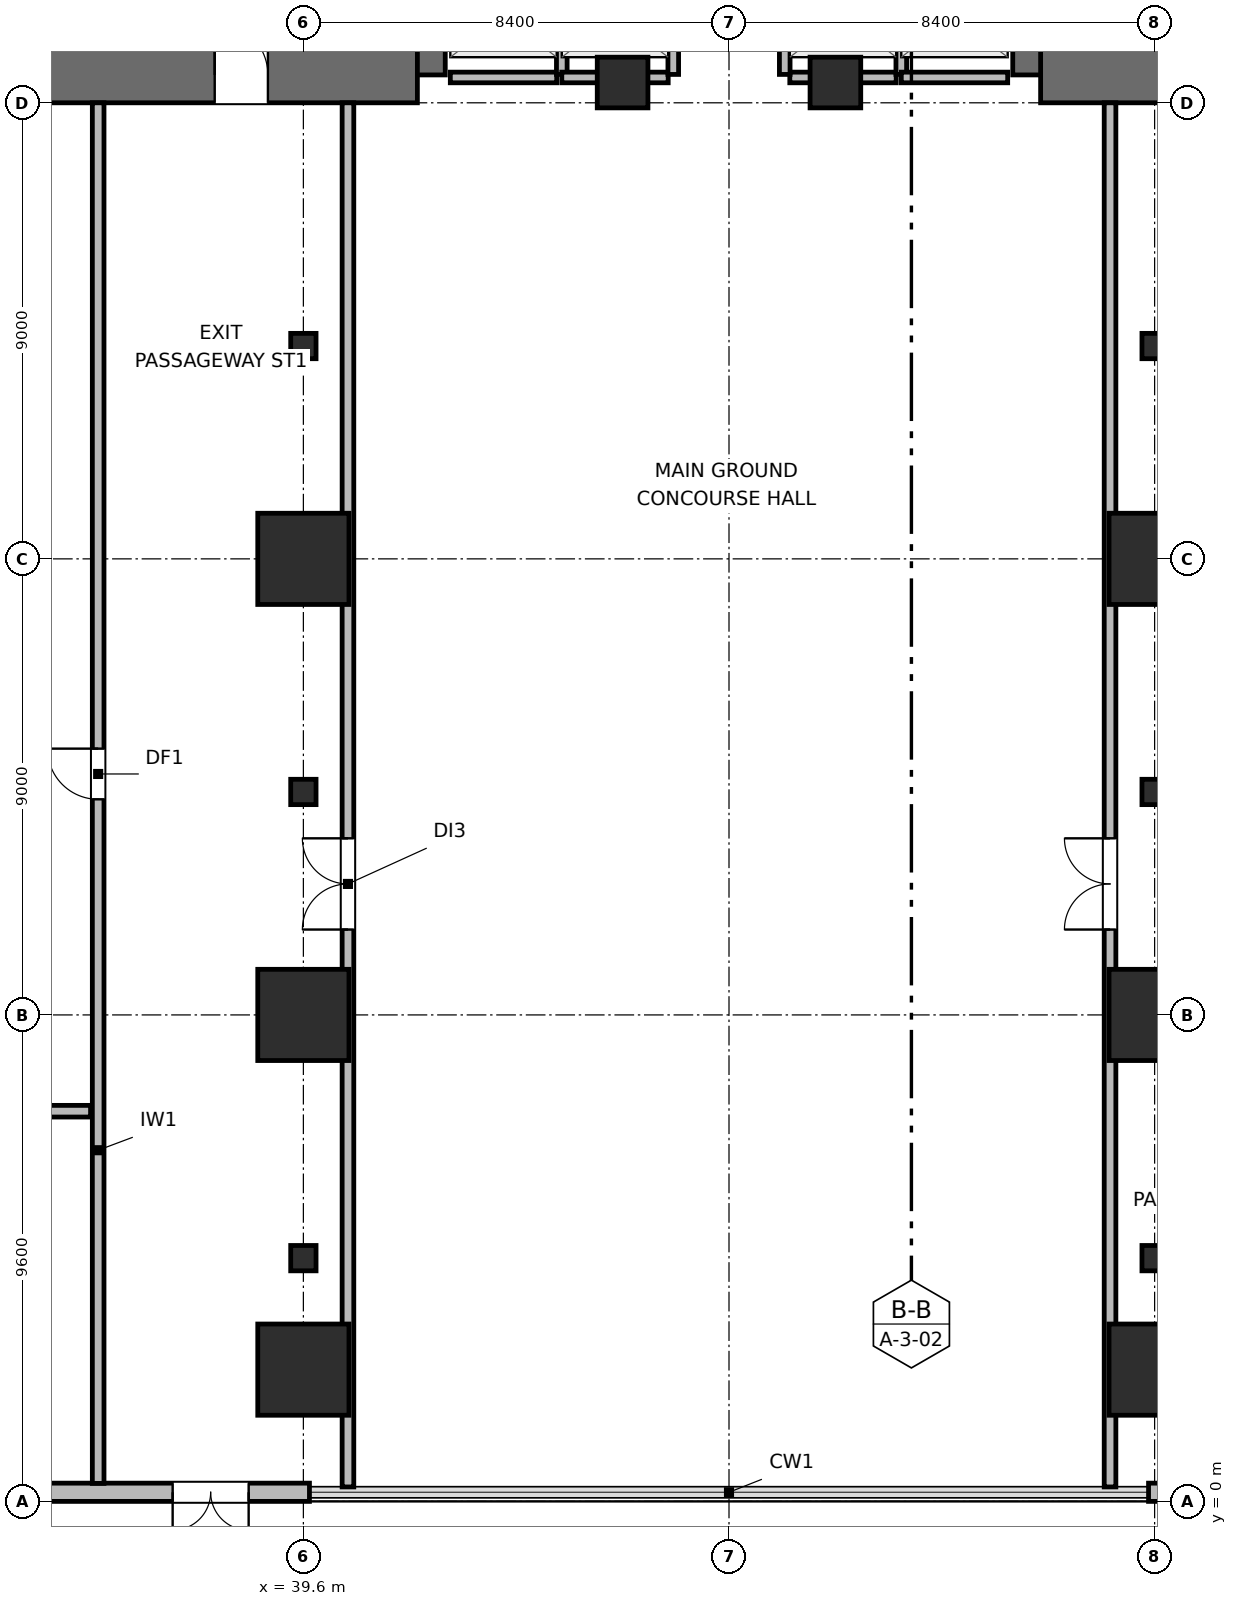
"""IFC4 building model, lengths in metres.
Left out: names, types, materials, properties, quantities, classifications, styles, units other than length and angle.
Written with IfcOpenShell. Run it as: python <this file> out.ifc"""

import sys

from ifc_helpers import new_model, si_unit, direction, frame, frame_2d, origin, origin_2d, place, context, subcontext, project, spatial, rectangle, hollow_rectangle, extrude, element, fill, save


model = new_model("IFC4")
c1 = context("Model", 3, precision=1e-05, world=origin(), true_north=direction((0.0, 1.0)))
c2 = subcontext(c1, "Body", "Model", "MODEL_VIEW")
j1 = project(units=[si_unit("LENGTHUNIT", "METRE"), si_unit("PLANEANGLEUNIT", "RADIAN")], contexts=[c1])
p1 = place(None, origin())
s1 = spatial("IfcSite", under=j1, at=p1, CompositionType="ELEMENT")
p2 = place(p1, origin())
s2 = spatial("IfcBuilding", under=s1, at=p2, CompositionType="ELEMENT")
p3 = place(p2, origin())
s3 = spatial("IfcBuildingStorey", under=s2, at=p3, CompositionType="ELEMENT", Elevation=0.0)
p4 = place(p3, frame((41.85, 28.15, 0.0), z_axis=(0.0, 0.0, 1.0), x_axis=(0.0, 1.0, 0.0)))
e1 = element("IfcWall", 1, at=p4, inside=s3, PredefinedType="SHEAR", context=c2, shape_type="SweptSolid", body=[
    extrude(rectangle(XDim=6.25, YDim=1.1, at=frame_2d((3.125, 0.0))), origin(), (0.0, 0.0, 1.0), 4.5),
])
p5 = place(p3, frame((32.95, 28.15, 0.0), z_axis=(0.0, 0.0, 1.0), x_axis=(1.0, 0.0, 0.0)))
e2 = element("IfcWall", 2, at=p5, inside=s3, PredefinedType="SHEAR", context=c2, shape_type="SweptSolid", body=[
    extrude(rectangle(XDim=8.9, YDim=1.1, at=frame_2d((4.45, 0.0))), origin(), (0.0, 0.0, 1.0), 4.5),
])
p6 = place(p5, frame((4.9, 0.0, 0.0)))
e3 = element("IfcOpeningElement", 3, at=p6, cuts=e2, PredefinedType="OPENING", context=c2, shape_type="SweptSolid", body=[
    extrude(rectangle(XDim=1.05, YDim=2.04, at=frame_2d((0.525, 1.02))), frame((0.0, 0.56, 0.0), z_axis=(0.0, -1.0, 0.0), x_axis=(1.0, 0.0, 0.0)), (0.0, 0.0, 1.0), 1.12),
])
p7 = place(p3, frame((54.15, 28.15, 0.0), z_axis=(0.0, 0.0, 1.0), x_axis=(0.0, 1.0, 0.0)))
e4 = element("IfcWall", 4, at=p7, inside=s3, PredefinedType="SHEAR", context=c2, shape_type="SweptSolid", body=[
    extrude(rectangle(XDim=7.65, YDim=1.1, at=frame_2d((3.825, 0.0))), origin(), (0.0, 0.0, 1.0), 4.5),
])
p8 = place(p3, frame((54.15, 28.15, 0.0), z_axis=(0.0, 0.0, 1.0), x_axis=(1.0, 0.0, 0.0)))
e5 = element("IfcWall", 5, at=p8, inside=s3, PredefinedType="SHEAR", context=c2, shape_type="SweptSolid", body=[
    extrude(rectangle(XDim=8.9, YDim=1.1, at=frame_2d((4.45, 0.0))), origin(), (0.0, 0.0, 1.0), 4.5),
])
p9 = place(p8, frame((3.85, 0.0, 0.0)))
e6 = element("IfcOpeningElement", 6, at=p9, cuts=e5, PredefinedType="OPENING", context=c2, shape_type="SweptSolid", body=[
    extrude(rectangle(XDim=1.05, YDim=2.04, at=frame_2d((0.525, 1.02))), frame((0.0, 0.56, 0.0), z_axis=(0.0, -1.0, 0.0), x_axis=(1.0, 0.0, 0.0)), (0.0, 0.0, 1.0), 1.12),
])
for number, where, z_axis, x_axis in (
    (7, (39.6, 2.6, 0.0), (0.0, 0.0, 1.0), (1.0, 0.0, 0.0)),
    (8, (39.6, 9.6, 0.0), (0.0, 0.0, 1.0), (1.0, 0.0, 0.0)),
    (9, (39.6, 18.6, 0.0), (0.0, 0.0, 1.0), (1.0, 0.0, 0.0)),
    (10, (56.4, 2.6, 0.0), (0.0, 0.0, 1.0), (1.0, 0.0, 0.0)),
    (11, (56.4, 9.6, 0.0), (0.0, 0.0, 1.0), (1.0, 0.0, 0.0)),
    (12, (56.4, 18.6, 0.0), (0.0, 0.0, 1.0), (1.0, 0.0, 0.0)),
):
    element("IfcColumn", number, at=place(p3, frame(where, z_axis=z_axis, x_axis=x_axis)), inside=s3, PredefinedType="COLUMN", context=c2, shape_type="SweptSolid", body=[
        extrude(rectangle(XDim=1.8, YDim=1.8, at=origin_2d()), origin(), (0.0, 0.0, 1.0), 4.5),
    ])
for number, where, z_axis, x_axis in (
    (13, (45.9, 28.0, 0.0), (0.0, 0.0, 1.0), (1.0, 0.0, 0.0)),
    (14, (50.1, 28.0, 0.0), (0.0, 0.0, 1.0), (1.0, 0.0, 0.0)),
):
    element("IfcColumn", number, at=place(p3, frame(where, z_axis=z_axis, x_axis=x_axis)), inside=s3, PredefinedType="COLUMN", context=c2, shape_type="SweptSolid", body=[
        extrude(rectangle(XDim=1.0, YDim=1.0, at=origin_2d()), origin(), (0.0, 0.0, 1.0), 4.5),
    ])
for number, where, z_axis, x_axis in (
    (15, (39.6, 4.8, 0.0), (0.0, 0.0, 1.0), (1.0, 0.0, 0.0)),
    (16, (39.6, 14.0, 0.0), (0.0, 0.0, 1.0), (1.0, 0.0, 0.0)),
    (17, (39.6, 22.8, 0.0), (0.0, 0.0, 1.0), (1.0, 0.0, 0.0)),
    (18, (56.4, 4.8, 0.0), (0.0, 0.0, 1.0), (1.0, 0.0, 0.0)),
    (19, (56.4, 14.0, 0.0), (0.0, 0.0, 1.0), (1.0, 0.0, 0.0)),
    (20, (56.4, 22.8, 0.0), (0.0, 0.0, 1.0), (1.0, 0.0, 0.0)),
):
    element("IfcColumn", number, at=place(p3, frame(where, z_axis=z_axis, x_axis=x_axis)), inside=s3, PredefinedType="PILASTER", context=c2, shape_type="SweptSolid", body=[
        extrude(hollow_rectangle(XDim=0.5, YDim=0.5, WallThickness=0.025, at=origin_2d()), origin(), (0.0, 0.0, 1.0), 4.18),
    ])
p10 = place(p3, frame((96.0, 0.18, 0.0), z_axis=(0.0, 0.0, 1.0), x_axis=(-1.0, 0.0, 0.0)))
e21 = element("IfcWall", 21, at=p10, inside=s3, PredefinedType="SOLIDWALL", context=c2, shape_type="SweptSolid", body=[
    extrude(rectangle(XDim=39.72, YDim=0.36, at=frame_2d((19.86, 0.0))), origin(), (0.0, 0.0, 1.0), 4.18),
])
p11 = place(p10, frame((37.0, 0.0, 0.0)))
e22 = element("IfcOpeningElement", 22, at=p11, cuts=e21, PredefinedType="OPENING", context=c2, shape_type="SweptSolid", body=[
    extrude(rectangle(XDim=1.5, YDim=2.15, at=frame_2d((0.75, 1.075))), frame((0.0, 0.19, 0.0), z_axis=(0.0, -1.0, 0.0), x_axis=(1.0, 0.0, 0.0)), (0.0, 0.0, 1.0), 0.38),
])
p12 = place(p10, frame((20.0, 0.0, 0.0)))
e23 = element("IfcOpeningElement", 23, at=p12, cuts=e21, PredefinedType="OPENING", context=c2, shape_type="SweptSolid", body=[
    extrude(rectangle(XDim=2.4, YDim=2.4, at=frame_2d((1.2, 1.2))), frame((0.0, 0.19, 0.0), z_axis=(0.0, -1.0, 0.0), x_axis=(1.0, 0.0, 0.0)), (0.0, 0.0, 1.0), 0.38),
])
p13 = place(p3, frame((39.72, 0.18, 0.0), z_axis=(0.0, 0.0, 1.0), x_axis=(-1.0, 0.0, 0.0)))
e24 = element("IfcWall", 24, at=p13, inside=s3, PredefinedType="SOLIDWALL", context=c2, shape_type="SweptSolid", body=[
    extrude(rectangle(XDim=39.72, YDim=0.36, at=frame_2d((19.86, 0.0))), origin(), (0.0, 0.0, 1.0), 4.18),
])
p14 = place(p13, frame((1.2, 0.0, 0.0)))
e25 = element("IfcOpeningElement", 25, at=p14, cuts=e24, PredefinedType="OPENING", context=c2, shape_type="SweptSolid", body=[
    extrude(rectangle(XDim=1.5, YDim=2.15, at=frame_2d((0.75, 1.075))), frame((0.0, 0.19, 0.0), z_axis=(0.0, -1.0, 0.0), x_axis=(1.0, 0.0, 0.0)), (0.0, 0.0, 1.0), 0.38),
])
p15 = place(p13, frame((21.0, 0.0, 0.0)))
e26 = element("IfcOpeningElement", 26, at=p15, cuts=e24, PredefinedType="OPENING", context=c2, shape_type="SweptSolid", body=[
    extrude(rectangle(XDim=2.4, YDim=2.4, at=frame_2d((1.2, 1.2))), frame((0.0, 0.19, 0.0), z_axis=(0.0, -1.0, 0.0), x_axis=(1.0, 0.0, 0.0)), (0.0, 0.0, 1.0), 0.38),
])
p16 = place(p13, frame((10.2, 0.0, 0.0)))
e27 = element("IfcOpeningElement", 27, at=p16, cuts=e24, PredefinedType="OPENING", context=c2, shape_type="SweptSolid", body=[
    extrude(rectangle(XDim=1.4, YDim=2.15, at=frame_2d((0.7, 1.075))), frame((0.0, 0.19, 0.0), z_axis=(0.0, -1.0, 0.0), x_axis=(1.0, 0.0, 0.0)), (0.0, 0.0, 1.0), 0.38),
])
p17 = place(p3, frame((42.5, 28.1, 0.0), z_axis=(0.0, 0.0, 1.0), x_axis=(1.0, 0.0, 0.0)))
e28 = element("IfcWall", 28, at=p17, inside=s3, PredefinedType="PARTITIONING", context=c2, shape_type="SweptSolid", body=[
    extrude(rectangle(XDim=2.1, YDim=0.21, at=frame_2d((1.05, 0.0))), origin(), (0.0, 0.0, 1.0), 3.065),
])
p18 = place(p3, frame((44.7, 28.16, 0.0), z_axis=(0.0, 0.0, 1.0), x_axis=(0.0, 1.0, 0.0)))
e29 = element("IfcWall", 29, at=p18, inside=s3, PredefinedType="PARTITIONING", context=c2, shape_type="SweptSolid", body=[
    extrude(rectangle(XDim=2.28, YDim=0.21, at=frame_2d((1.14, 0.0))), origin(), (0.0, 0.0, 1.0), 4.18),
])
p19 = place(p3, frame((44.7, 28.1, 0.0), z_axis=(0.0, 0.0, 1.0), x_axis=(1.0, 0.0, 0.0)))
e30 = element("IfcWall", 30, at=p19, inside=s3, PredefinedType="PARTITIONING", context=c2, shape_type="SweptSolid", body=[
    extrude(rectangle(XDim=2.1, YDim=0.21, at=frame_2d((1.05, 0.0))), origin(), (0.0, 0.0, 1.0), 3.065),
])
p20 = place(p3, frame((46.9, 28.16, 0.0), z_axis=(0.0, 0.0, 1.0), x_axis=(0.0, 1.0, 0.0)))
e31 = element("IfcWall", 31, at=p20, inside=s3, PredefinedType="PARTITIONING", context=c2, shape_type="SweptSolid", body=[
    extrude(rectangle(XDim=2.28, YDim=0.21, at=frame_2d((1.14, 0.0))), origin(), (0.0, 0.0, 1.0), 4.18),
])
p21 = place(p3, frame((49.2, 28.1, 0.0), z_axis=(0.0, 0.0, 1.0), x_axis=(1.0, 0.0, 0.0)))
e32 = element("IfcWall", 32, at=p21, inside=s3, PredefinedType="PARTITIONING", context=c2, shape_type="SweptSolid", body=[
    extrude(rectangle(XDim=2.1, YDim=0.21, at=frame_2d((1.05, 0.0))), origin(), (0.0, 0.0, 1.0), 3.065),
])
for number, where, z_axis, x_axis in (
    (33, (49.1, 28.16, 0.0), (0.0, 0.0, 1.0), (0.0, 1.0, 0.0)),
    (34, (51.4, 28.16, 0.0), (0.0, 0.0, 1.0), (0.0, 1.0, 0.0)),
):
    element("IfcWall", number, at=place(p3, frame(where, z_axis=z_axis, x_axis=x_axis)), inside=s3, PredefinedType="PARTITIONING", context=c2, shape_type="SweptSolid", body=[
        extrude(rectangle(XDim=2.28, YDim=0.21, at=frame_2d((1.14, 0.0))), origin(), (0.0, 0.0, 1.0), 4.18),
    ])
p22 = place(p3, frame((51.4, 28.1, 0.0), z_axis=(0.0, 0.0, 1.0), x_axis=(1.0, 0.0, 0.0)))
e35 = element("IfcWall", 35, at=p22, inside=s3, PredefinedType="PARTITIONING", context=c2, shape_type="SweptSolid", body=[
    extrude(rectangle(XDim=2.1, YDim=0.21, at=frame_2d((1.05, 0.0))), origin(), (0.0, 0.0, 1.0), 3.065),
])
p23 = place(p3, frame((35.55, 0.355, 0.0), z_axis=(0.0, 0.0, 1.0), x_axis=(0.0, 1.0, 0.0)))
e36 = element("IfcWall", 36, at=p23, inside=s3, PredefinedType="PARTITIONING", context=c2, shape_type="SweptSolid", body=[
    extrude(rectangle(XDim=27.245, YDim=0.23, at=frame_2d((13.623, 0.0))), origin(), (0.0, 0.0, 1.0), 4.18),
])
p24 = place(p23, frame((13.5, 0.0, 0.0)))
e37 = element("IfcOpeningElement", 37, at=p24, cuts=e36, PredefinedType="OPENING", context=c2, shape_type="SweptSolid", body=[
    extrude(rectangle(XDim=1.0, YDim=2.04, at=frame_2d((0.5, 1.02))), frame((0.0, 0.125, 0.0), z_axis=(0.0, -1.0, 0.0), x_axis=(1.0, 0.0, 0.0)), (0.0, 0.0, 1.0), 0.25),
])
p25 = place(p3, frame((40.48, 0.285, 0.0), z_axis=(0.0, 0.0, 1.0), x_axis=(0.0, 1.0, 0.0)))
e38 = element("IfcWall", 38, at=p25, inside=s3, PredefinedType="PARTITIONING", context=c2, shape_type="SweptSolid", body=[
    extrude(rectangle(XDim=27.315, YDim=0.23, at=frame_2d((13.658, 0.0))), origin(), (0.0, 0.0, 1.0), 4.18),
])
p26 = place(p25, frame((11.0, 0.0, 0.0)))
e39 = element("IfcOpeningElement", 39, at=p26, cuts=e38, PredefinedType="OPENING", context=c2, shape_type="SweptSolid", body=[
    extrude(rectangle(XDim=1.8, YDim=2.06, at=frame_2d((0.9, 1.03))), frame((0.0, 0.125, 0.0), z_axis=(0.0, -1.0, 0.0), x_axis=(1.0, 0.0, 0.0)), (0.0, 0.0, 1.0), 0.25),
])
p27 = place(p3, frame((55.52, 0.285, 0.0), z_axis=(0.0, 0.0, 1.0), x_axis=(0.0, 1.0, 0.0)))
e40 = element("IfcWall", 40, at=p27, inside=s3, PredefinedType="PARTITIONING", context=c2, shape_type="SweptSolid", body=[
    extrude(rectangle(XDim=27.315, YDim=0.23, at=frame_2d((13.658, 0.0))), origin(), (0.0, 0.0, 1.0), 4.18),
])
p28 = place(p27, frame((11.0, 0.0, 0.0)))
e41 = element("IfcOpeningElement", 41, at=p28, cuts=e40, PredefinedType="OPENING", context=c2, shape_type="SweptSolid", body=[
    extrude(rectangle(XDim=1.8, YDim=2.06, at=frame_2d((0.9, 1.03))), frame((0.0, 0.125, 0.0), z_axis=(0.0, -1.0, 0.0), x_axis=(1.0, 0.0, 0.0)), (0.0, 0.0, 1.0), 0.25),
])
p29 = place(p3, frame((25.5, 7.7, 0.0), z_axis=(0.0, 0.0, 1.0), x_axis=(1.0, 0.0, 0.0)))
e42 = element("IfcWall", 42, at=p29, inside=s3, PredefinedType="PARTITIONING", context=c2, shape_type="SweptSolid", body=[
    extrude(rectangle(XDim=9.9, YDim=0.23, at=frame_2d((4.95, 0.0))), origin(), (0.0, 0.0, 1.0), 4.18),
])
p30 = place(p29, frame((3.5, 0.0, 0.0)))
e43 = element("IfcOpeningElement", 43, at=p30, cuts=e42, PredefinedType="OPENING", context=c2, shape_type="SweptSolid", body=[
    extrude(rectangle(XDim=1.0, YDim=2.04, at=frame_2d((0.5, 1.02))), frame((0.0, 0.125, 0.0), z_axis=(0.0, -1.0, 0.0), x_axis=(1.0, 0.0, 0.0)), (0.0, 0.0, 1.0), 0.25),
])
p31 = place(p14, origin())
e44 = element("IfcDoor", 44, at=p31, inside=s3, OperationType="DOUBLE_DOOR_SINGLE_SWING", PredefinedType="DOOR", context=c2, shape_type="SweptSolid", body=[
    extrude(rectangle(XDim=1.5, YDim=2.15, at=frame_2d((0.75, 1.075))), frame((0.0, 0.025, 0.0), z_axis=(0.0, -1.0, 0.0), x_axis=(1.0, 0.0, 0.0)), (0.0, 0.0, 1.0), 0.05),
])
fill(e25, e44)
p32 = place(p6, origin())
e45 = element("IfcDoor", 45, at=p32, inside=s3, OperationType="SINGLE_SWING_LEFT", PredefinedType="DOOR", context=c2, shape_type="SweptSolid", body=[
    extrude(rectangle(XDim=1.05, YDim=2.04, at=frame_2d((0.525, 1.02))), frame((0.0, 0.025, 0.0), z_axis=(0.0, -1.0, 0.0), x_axis=(1.0, 0.0, 0.0)), (0.0, 0.0, 1.0), 0.05),
])
fill(e3, e45)
p33 = place(p24, origin())
e46 = element("IfcDoor", 46, at=p33, inside=s3, OperationType="SINGLE_SWING_RIGHT", PredefinedType="DOOR", context=c2, shape_type="SweptSolid", body=[
    extrude(rectangle(XDim=1.0, YDim=2.04, at=frame_2d((0.5, 1.02))), frame((0.0, 0.025, 0.0), z_axis=(0.0, -1.0, 0.0), x_axis=(1.0, 0.0, 0.0)), (0.0, 0.0, 1.0), 0.05),
])
fill(e37, e46)
p34 = place(p26, origin())
e47 = element("IfcDoor", 47, at=p34, inside=s3, OperationType="DOUBLE_DOOR_SINGLE_SWING", PredefinedType="DOOR", context=c2, shape_type="SweptSolid", body=[
    extrude(rectangle(XDim=1.8, YDim=2.06, at=frame_2d((0.9, 1.03))), frame((0.0, 0.025, 0.0), z_axis=(0.0, -1.0, 0.0), x_axis=(1.0, 0.0, 0.0)), (0.0, 0.0, 1.0), 0.05),
])
fill(e39, e47)
p35 = place(p28, origin())
e48 = element("IfcDoor", 48, at=p35, inside=s3, OperationType="DOUBLE_DOOR_SINGLE_SWING", PredefinedType="DOOR", context=c2, shape_type="SweptSolid", body=[
    extrude(rectangle(XDim=1.8, YDim=2.06, at=frame_2d((0.9, 1.03))), frame((0.0, 0.025, 0.0), z_axis=(0.0, -1.0, 0.0), x_axis=(1.0, 0.0, 0.0)), (0.0, 0.0, 1.0), 0.05),
])
fill(e41, e48)
save(model, sys.argv[1])
